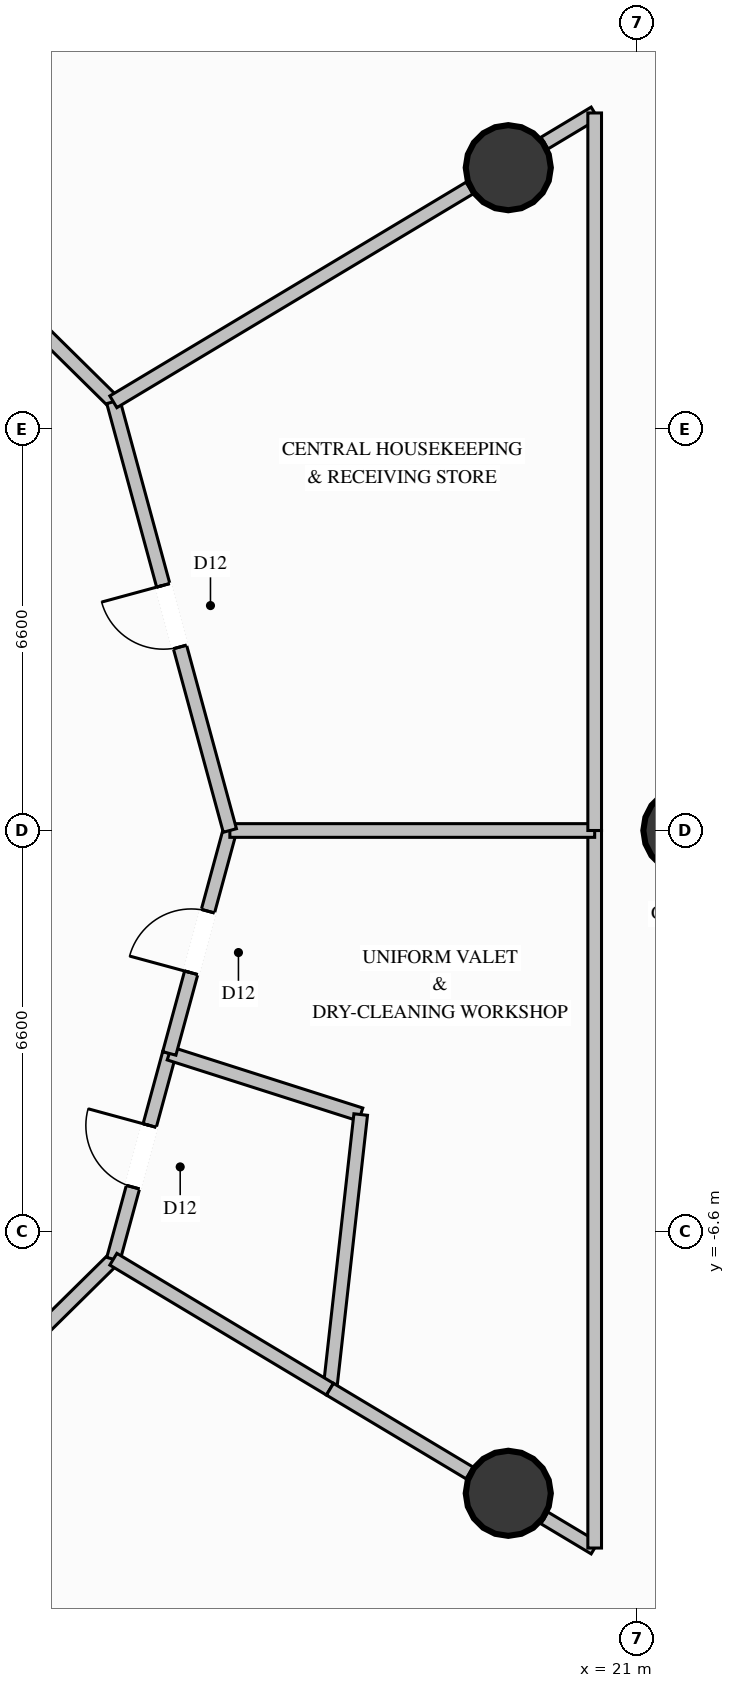
"""IFC4 building model, lengths in metres.
Left out: names, types, materials, properties, quantities, classifications, styles, units other than length and angle.
Written with IfcOpenShell. Run it as: python <this file> out.ifc"""

import sys

from ifc_helpers import new_model, si_unit, direction, frame, frame_2d, origin, origin_2d, place, context, subcontext, project, spatial, rectangle, circle, extrude, element, fill, save


model = new_model("IFC4")
c1 = context("Model", 3, precision=1e-05, world=origin(), true_north=direction((0.0, 1.0)))
c2 = subcontext(c1, "Body", "Model", "MODEL_VIEW")
j1 = project(units=[si_unit("LENGTHUNIT", "METRE"), si_unit("PLANEANGLEUNIT", "RADIAN")], contexts=[c1])
p1 = place(None, origin())
s1 = spatial("IfcSite", under=j1, at=p1, CompositionType="ELEMENT")
p2 = place(p1, origin())
s2 = spatial("IfcBuilding", under=s1, at=p2, CompositionType="ELEMENT")
p3 = place(p2, frame((0.0, 0.0, -4.8)))
s3 = spatial("IfcBuildingStorey", under=s2, at=p3, CompositionType="ELEMENT", Elevation=-4.8)
for number, where, z_axis, x_axis in (
    (1, (21.8, 0.0, 0.0), (0.0, 0.0, 1.0), (1.0, 0.0, 0.0)),
    (2, (18.879, 10.9, 0.0), (0.0, 0.0, 1.0), (1.0, 0.0, 0.0)),
    (3, (18.879, -10.9, 0.0), (0.0, 0.0, 1.0), (1.0, 0.0, 0.0)),
):
    element("IfcColumn", number, at=place(p3, frame(where, z_axis=z_axis, x_axis=x_axis)), inside=s3, PredefinedType="COLUMN", context=c2, shape_type="SweptSolid", body=[
        extrude(circle(Radius=0.7, at=origin_2d()), origin(), (0.0, 0.0, 1.0), 4.8),
    ])
for number, where, z_axis, x_axis in (
    (4, (12.384, 7.05, 0.0), (0.0, 0.0, 1.0), (-0.712, 0.702, 0.0)),
    (5, (7.15, -12.211, 0.0), (0.0, 0.0, 1.0), (0.712, 0.702, 0.0)),
):
    element("IfcWall", number, at=place(p3, frame(where, z_axis=z_axis, x_axis=x_axis)), inside=s3, PredefinedType="PARTITIONING", context=c2, shape_type="SweptSolid", body=[
        extrude(rectangle(XDim=7.351, YDim=0.225, at=frame_2d((3.675, 0.0))), origin(), (0.0, 0.0, 1.0), 4.395),
    ])
p4 = place(p3, frame((12.384, -7.05, 0.0), z_axis=(0.0, 0.0, 1.0), x_axis=(0.262322060278, 0.964980381506, 0.0)))
e6 = element("IfcWall", 6, at=p4, inside=s3, PredefinedType="PARTITIONING", context=c2, shape_type="SweptSolid", body=[
    extrude(rectangle(XDim=3.507, YDim=0.225, at=frame_2d((1.753, 0.0))), origin(), (0.0, 0.0, 1.0), 4.395),
])
p5 = place(p4, frame((1.228, 0.0, 0.0)))
e7 = element("IfcOpeningElement", 7, at=p5, cuts=e6, PredefinedType="OPENING", context=c2, shape_type="SweptSolid", body=[
    extrude(rectangle(XDim=1.05, YDim=2.15, at=frame_2d((0.525, 1.075))), frame((0.0, 0.123, 0.0), z_axis=(0.0, -1.0, 0.0), x_axis=(1.0, 0.0, 0.0)), (0.0, 0.0, 1.0), 0.245),
])
p6 = place(p3, frame((13.304, -3.666, 0.0), z_axis=(0.0, 0.0, 1.0), x_axis=(0.952640086108, -0.304100092634, 0.0)))
e8 = element("IfcWall", 8, at=p6, inside=s3, PredefinedType="PARTITIONING", context=c2, shape_type="SweptSolid", body=[
    extrude(rectangle(XDim=3.304, YDim=0.225, at=frame_2d((1.652, 0.0))), origin(), (0.0, 0.0, 1.0), 4.395),
])
p7 = place(p3, frame((16.452, -4.671, 0.0), z_axis=(0.0, 0.0, 1.0), x_axis=(-0.111292193905, -0.993787727624, 0.0)))
e9 = element("IfcWall", 9, at=p7, inside=s3, PredefinedType="PARTITIONING", context=c2, shape_type="SweptSolid", body=[
    extrude(rectangle(XDim=4.545, YDim=0.225, at=frame_2d((2.273, 0.0))), origin(), (0.0, 0.0, 1.0), 4.395),
])
p8 = place(p3, frame((15.946, -9.188, 0.0), z_axis=(0.0, 0.0, 1.0), x_axis=(-0.857415135643, 0.514625383333, 0.0)))
e10 = element("IfcWall", 10, at=p8, inside=s3, PredefinedType="PARTITIONING", context=c2, shape_type="SweptSolid", body=[
    extrude(rectangle(XDim=4.154, YDim=0.225, at=frame_2d((2.077, 0.0))), origin(), (0.0, 0.0, 1.0), 3.686),
])
p9 = place(p3, frame((13.304, -3.666, 0.0), z_axis=(0.0, 0.0, 1.0), x_axis=(0.262203727329, 0.965012541563, 0.0)))
e11 = element("IfcWall", 11, at=p9, inside=s3, PredefinedType="PARTITIONING", context=c2, shape_type="SweptSolid", body=[
    extrude(rectangle(XDim=3.799, YDim=0.225, at=frame_2d((1.899, 0.0))), origin(), (0.0, 0.0, 1.0), 4.395),
])
p10 = place(p9, frame((1.374, 0.0, 0.0)))
e12 = element("IfcOpeningElement", 12, at=p10, cuts=e11, PredefinedType="OPENING", context=c2, shape_type="SweptSolid", body=[
    extrude(rectangle(XDim=1.05, YDim=2.15, at=frame_2d((0.525, 1.075))), frame((0.0, 0.123, 0.0), z_axis=(0.0, -1.0, 0.0), x_axis=(1.0, 0.0, 0.0)), (0.0, 0.0, 1.0), 0.245),
])
p11 = place(p3, frame((20.3, -11.8, 0.0), z_axis=(0.0, 0.0, 1.0), x_axis=(-0.857694193222, 0.514160160761, 0.0)))
e13 = element("IfcWall", 13, at=p11, inside=s3, PredefinedType="PARTITIONING", context=c2, shape_type="SweptSolid", body=[
    extrude(rectangle(XDim=0.963, YDim=0.225, at=frame_2d((0.481, 0.0))), origin(), (0.0, 0.0, 1.0), 3.63),
])
p12 = place(p3, frame((18.242, -10.565, 0.0), z_axis=(0.0, 0.0, 1.0), x_axis=(-0.857589469087, 0.514334815573, 0.0)))
e14 = element("IfcWall", 14, at=p12, inside=s3, PredefinedType="PARTITIONING", context=c2, shape_type="SweptSolid", body=[
    extrude(rectangle(XDim=2.677, YDim=0.225, at=frame_2d((1.339, 0.0))), origin(), (0.0, 0.0, 1.0), 3.686),
])
p13 = place(p3, frame((20.3, 0.0, 0.0), z_axis=(0.0, 0.0, 1.0), x_axis=(0.0, -1.0, 0.0)))
e15 = element("IfcWall", 15, at=p13, inside=s3, PredefinedType="PARTITIONING", context=c2, shape_type="SweptSolid", body=[
    extrude(rectangle(XDim=11.8, YDim=0.225, at=frame_2d((5.9, 0.0))), origin(), (0.0, 0.0, 1.0), 4.395),
])
p14 = place(p3, frame((14.3, 0.0, 0.0), z_axis=(0.0, 0.0, 1.0), x_axis=(1.0, 0.0, 0.0)))
e16 = element("IfcWall", 16, at=p14, inside=s3, PredefinedType="PARTITIONING", context=c2, shape_type="SweptSolid", body=[
    extrude(rectangle(XDim=6.0, YDim=0.225, at=frame_2d((3.0, 0.0))), origin(), (0.0, 0.0, 1.0), 3.686),
])
p15 = place(p3, frame((14.3, 0.0, 0.0), z_axis=(0.0, 0.0, 1.0), x_axis=(-0.262260528785, 0.964997106235, 0.0)))
e17 = element("IfcWall", 17, at=p15, inside=s3, PredefinedType="PARTITIONING", context=c2, shape_type="SweptSolid", body=[
    extrude(rectangle(XDim=7.306, YDim=0.225, at=frame_2d((3.653, 0.0))), origin(), (0.0, 0.0, 1.0), 4.395),
])
p16 = place(p15, frame((3.128, 0.0, 0.0)))
e18 = element("IfcOpeningElement", 18, at=p16, cuts=e17, PredefinedType="OPENING", context=c2, shape_type="SweptSolid", body=[
    extrude(rectangle(XDim=1.05, YDim=2.15, at=frame_2d((0.525, 1.075))), frame((0.0, 0.123, 0.0), z_axis=(0.0, -1.0, 0.0), x_axis=(1.0, 0.0, 0.0)), (0.0, 0.0, 1.0), 0.245),
])
p17 = place(p3, frame((12.384, 7.05, 0.0), z_axis=(0.0, 0.0, 1.0), x_axis=(0.857483465664, 0.514511521846, 0.0)))
e19 = element("IfcWall", 19, at=p17, inside=s3, PredefinedType="PARTITIONING", context=c2, shape_type="SweptSolid", body=[
    extrude(rectangle(XDim=6.832, YDim=0.225, at=frame_2d((3.416, 0.0))), origin(), (0.0, 0.0, 1.0), 3.686),
])
p18 = place(p3, frame((19.475, 11.305, 0.0), z_axis=(0.0, 0.0, 1.0), x_axis=(0.857425748935, 0.51460770016, 0.0)))
e20 = element("IfcWall", 20, at=p18, inside=s3, PredefinedType="PARTITIONING", context=c2, shape_type="SweptSolid", body=[
    extrude(rectangle(XDim=0.962, YDim=0.225, at=frame_2d((0.481, 0.0))), origin(), (0.0, 0.0, 1.0), 3.63),
])
p19 = place(p3, frame((20.3, 11.8, 0.0), z_axis=(0.0, 0.0, 1.0), x_axis=(0.0, -1.0, 0.0)))
e21 = element("IfcWall", 21, at=p19, inside=s3, PredefinedType="PARTITIONING", context=c2, shape_type="SweptSolid", body=[
    extrude(rectangle(XDim=11.8, YDim=0.225, at=frame_2d((5.9, 0.0))), origin(), (0.0, 0.0, 1.0), 4.395),
])
p20 = place(p5, origin())
e22 = element("IfcDoor", 22, at=p20, inside=s3, OperationType="SINGLE_SWING_RIGHT", PredefinedType="DOOR", context=c2, shape_type="SweptSolid", body=[
    extrude(rectangle(XDim=1.05, YDim=2.15, at=frame_2d((0.525, 1.075))), frame((0.0, 0.025, 0.0), z_axis=(0.0, -1.0, 0.0), x_axis=(1.0, 0.0, 0.0)), (0.0, 0.0, 1.0), 0.05),
])
fill(e7, e22)
p21 = place(p10, origin())
e23 = element("IfcDoor", 23, at=p21, inside=s3, OperationType="SINGLE_SWING_LEFT", PredefinedType="DOOR", context=c2, shape_type="SweptSolid", body=[
    extrude(rectangle(XDim=1.05, YDim=2.15, at=frame_2d((0.525, 1.075))), frame((0.0, 0.025, 0.0), z_axis=(0.0, -1.0, 0.0), x_axis=(1.0, 0.0, 0.0)), (0.0, 0.0, 1.0), 0.05),
])
fill(e12, e23)
p22 = place(p16, origin())
e24 = element("IfcDoor", 24, at=p22, inside=s3, OperationType="SINGLE_SWING_RIGHT", PredefinedType="DOOR", context=c2, shape_type="SweptSolid", body=[
    extrude(rectangle(XDim=1.05, YDim=2.15, at=frame_2d((0.525, 1.075))), frame((0.0, 0.025, 0.0), z_axis=(0.0, -1.0, 0.0), x_axis=(1.0, 0.0, 0.0)), (0.0, 0.0, 1.0), 0.05),
])
fill(e18, e24)
save(model, sys.argv[1])
